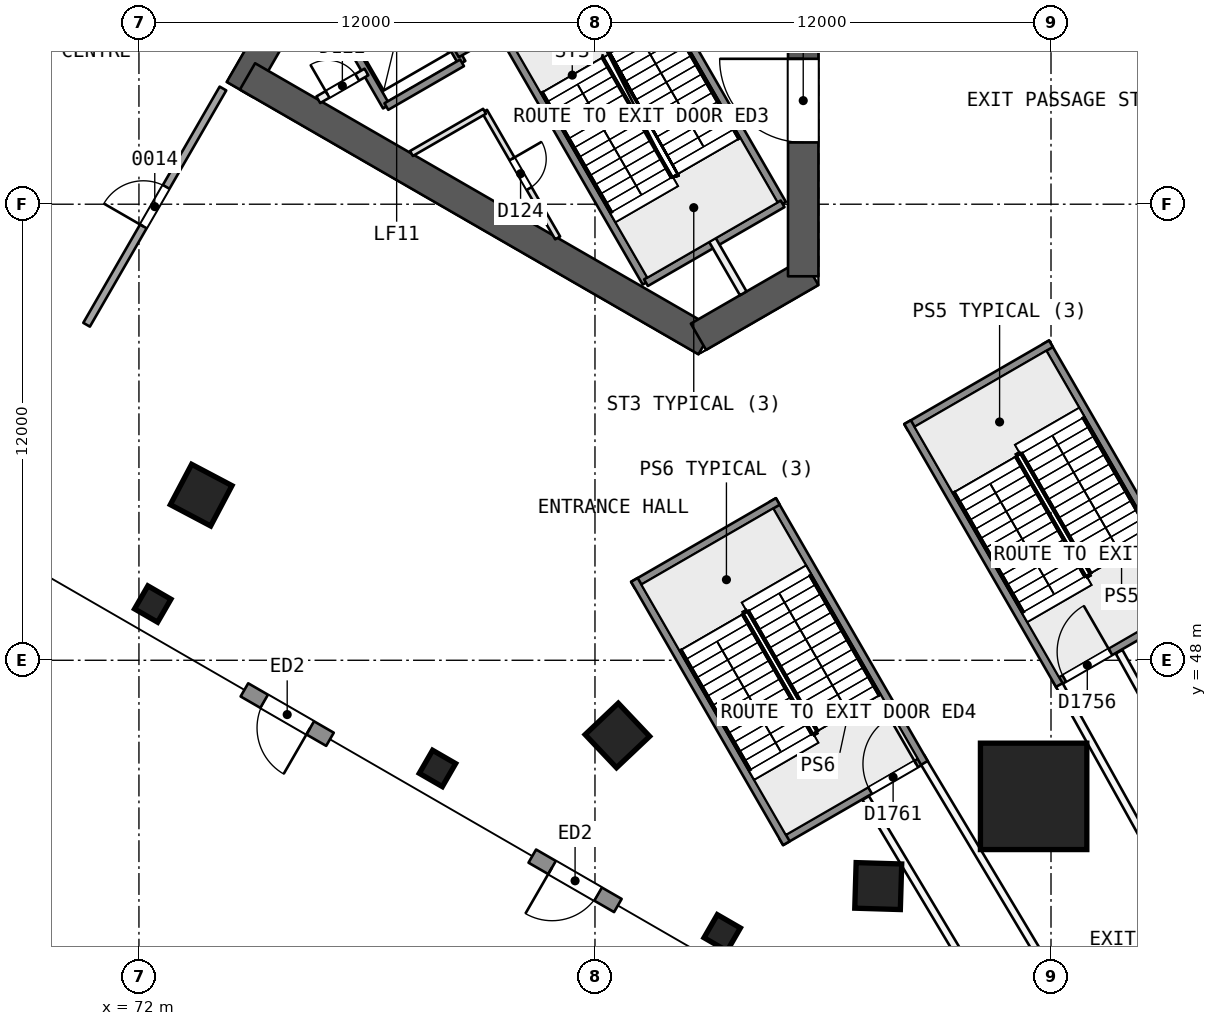
"""IFC4 building model, lengths in metres.
Left out: names, types, materials, properties, quantities, classifications, styles, units other than length and angle.
Written with IfcOpenShell. Run it as: python <this file> out.ifc"""

import sys

from ifc_helpers import new_model, si_unit, direction, frame, frame_2d, origin, origin_2d, place, context, subcontext, project, spatial, rectangle, extrude, element, fill, save


model = new_model("IFC4")
c1 = context("Model", 3, precision=1e-05, world=origin(), true_north=direction((0.0, 1.0)))
c2 = subcontext(c1, "Body", "Model", "MODEL_VIEW")
j1 = project(units=[si_unit("LENGTHUNIT", "METRE"), si_unit("PLANEANGLEUNIT", "RADIAN")], contexts=[c1])
p1 = place(None, origin())
s1 = spatial("IfcSite", under=j1, at=p1, CompositionType="ELEMENT")
p2 = place(p1, origin())
s2 = spatial("IfcBuilding", under=s1, at=p2, CompositionType="ELEMENT")
p3 = place(p2, origin())
s3 = spatial("IfcBuildingStorey", under=s2, at=p3, CompositionType="ELEMENT", Elevation=0.0)
p4 = place(p3, frame((79.731, 71.806, 0.0), z_axis=(0.0, 0.0, 1.0), x_axis=(-0.49999662545, -0.866027352073, 0.0)))
e1 = element("IfcWall", 1, at=p4, inside=s3, PredefinedType="SHEAR", context=c2, shape_type="SweptSolid", body=[
    extrude(rectangle(XDim=10.149, YDim=0.8, at=frame_2d((5.074, 0.0))), origin(), (0.0, 0.0, 1.0), 9.0),
])
p5 = place(p4, frame((0.719, 0.0, 0.0)))
e2 = element("IfcOpeningElement", 2, at=p5, cuts=e1, PredefinedType="OPENING", context=c2, shape_type="SweptSolid", body=[
    extrude(rectangle(XDim=1.2, YDim=2.1, at=frame_2d((0.6, 1.05))), frame((0.0, 0.411, 0.0), z_axis=(0.0, -1.0, 0.0), x_axis=(1.0, 0.0, 0.0)), (0.0, 0.0, 1.0), 0.821),
])
p6 = place(p3, frame((74.856, 63.363, 0.0), z_axis=(0.0, 0.0, 1.0), x_axis=(0.866029478545, -0.499992942241, 0.0)))
e3 = element("IfcWall", 3, at=p6, inside=s3, PredefinedType="SHEAR", context=c2, shape_type="SweptSolid", body=[
    extrude(rectangle(XDim=13.933, YDim=0.8, at=frame_2d((6.967, 0.0))), origin(), (0.0, 0.0, 1.0), 9.0),
])
p7 = place(p3, frame((86.723, 56.512, 0.0), z_axis=(0.0, 0.0, 1.0), x_axis=(0.866034355626, 0.499984494636, 0.0)))
e4 = element("IfcWall", 4, at=p7, inside=s3, PredefinedType="SHEAR", context=c2, shape_type="SweptSolid", body=[
    extrude(rectangle(XDim=3.414, YDim=0.8, at=frame_2d((1.707, 0.0))), origin(), (0.0, 0.0, 1.0), 9.0),
])
p8 = place(p3, frame((89.48, 58.103, 0.0), z_axis=(0.0, 0.0, 1.0), x_axis=(0.0, 1.0, 0.0)))
e5 = element("IfcWall", 5, at=p8, inside=s3, PredefinedType="SHEAR", context=c2, shape_type="SweptSolid", body=[
    extrude(rectangle(XDim=14.103, YDim=0.8, at=frame_2d((7.051, 0.0))), origin(), (0.0, 0.0, 1.0), 9.0),
])
p9 = place(p8, frame((3.522, 0.0, 0.0)))
e6 = element("IfcOpeningElement", 6, at=p9, cuts=e5, PredefinedType="OPENING", context=c2, shape_type="SweptSolid", body=[
    extrude(rectangle(XDim=2.2, YDim=2.1, at=frame_2d((1.1, 1.05))), frame((0.0, 0.411, 0.0), z_axis=(0.0, -1.0, 0.0), x_axis=(1.0, 0.0, 0.0)), (0.0, 0.0, 1.0), 0.821),
])
p10 = place(p3, frame((73.636, 52.318, 0.0), z_axis=(0.000867829423, 0.022807642022, 0.999739495237), x_axis=(-0.500355390418, -0.865584884997, 0.020181430685)))
e7 = element("IfcColumn", 7, at=p10, inside=s3, PredefinedType="COLUMN", context=c2, shape_type="SweptSolid", body=[
    extrude(rectangle(XDim=1.2, YDim=1.2, at=origin_2d()), origin(), (0.0, 0.0, 1.0), 9.002),
])
p11 = place(p3, frame((84.6, 45.988, 0.0), z_axis=(-0.008378546441, 0.028145408434, 0.999568724973), x_axis=(-0.500025098605, -0.865775601782, 0.02018683049)))
e8 = element("IfcColumn", 8, at=p11, inside=s3, PredefinedType="COLUMN", context=c2, shape_type="SweptSolid", body=[
    extrude(rectangle(XDim=1.2, YDim=1.2, at=origin_2d()), origin(), (0.0, 0.0, 1.0), 9.004),
])
p12 = place(p3, frame((95.564, 44.382, 0.0), z_axis=(-0.017594335484, 0.030498655501, 0.999379943451), x_axis=(0.499388079432, -0.86566264647, 0.035209780296)))
e9 = element("IfcColumn", 9, at=p12, inside=s3, PredefinedType="COLUMN", context=c2, shape_type="SweptSolid", body=[
    extrude(rectangle(XDim=2.8, YDim=2.8, at=origin_2d()), origin(), (0.0, 0.0, 1.0), 9.006),
])
p13 = place(p3, frame((91.472, 42.02, 0.0), z_axis=(-0.015018837551, 0.031962471973, 0.999376222903), x_axis=(0.397533128539, -0.916908599769, 0.035299169714)))
e10 = element("IfcColumn", 10, at=p13, inside=s3, PredefinedType="COLUMN", context=c2, shape_type="SweptSolid", body=[
    extrude(rectangle(XDim=1.2, YDim=1.2, at=origin_2d()), origin(), (0.0, 0.0, 1.0), 9.006),
])
for number, where, z_axis, x_axis in (
    (11, (72.363, 49.479, -0.4), (0.0, 0.0, 1.0), (0.5, 0.866, 0.0)),
    (12, (79.855, 45.154, -0.4), (0.0, 0.0, 1.0), (0.5, 0.866, 0.0)),
    (13, (87.348, 40.828, -0.4), (0.0, 0.0, 1.0), (0.5, 0.866, 0.0)),
):
    element("IfcColumn", number, at=place(p3, frame(where, z_axis=z_axis, x_axis=x_axis)), inside=s3, PredefinedType="COLUMN", context=c2, shape_type="SweptSolid", body=[
        extrude(rectangle(XDim=0.7, YDim=0.7, at=origin_2d()), origin(), (0.0, 0.0, 1.0), 9.4),
    ])
p14 = place(p3, frame((70.622, 56.829, 0.0), z_axis=(0.0, 0.0, 1.0), x_axis=(0.499995327129, 0.866028101651, 0.0)))
e14 = element("IfcWall", 14, at=p14, inside=s3, PredefinedType="PARTITIONING", context=c2, shape_type="SweptSolid", body=[
    extrude(rectangle(XDim=7.177, YDim=0.2, at=frame_2d((3.588, 0.0))), origin(), (0.0, 0.0, 1.0), 8.6),
])
p15 = place(p14, frame((2.988, 0.0, 0.0)))
e15 = element("IfcOpeningElement", 15, at=p15, cuts=e14, PredefinedType="OPENING", context=c2, shape_type="SweptSolid", body=[
    extrude(rectangle(XDim=1.2, YDim=2.4, at=frame_2d((0.6, 1.2))), frame((0.0, 0.11, 0.0), z_axis=(0.0, -1.0, 0.0), x_axis=(1.0, 0.0, 0.0)), (0.0, 0.0, 1.0), 0.221),
])
p16 = place(p3, frame((77.027, 45.921, 0.0), z_axis=(0.0, 0.0, 1.0), x_axis=(-0.866021400173, 0.500006934395, 0.0)))
e16 = element("IfcWall", 16, at=p16, inside=s3, PredefinedType="SOLIDWALL", context=c2, shape_type="SweptSolid", body=[
    extrude(rectangle(XDim=2.6, YDim=0.4, at=frame_2d((1.3, 0.0))), origin(), (0.0, 0.0, 1.0), 8.6),
])
p17 = place(p16, frame((0.6, 0.0, 0.0)))
e17 = element("IfcOpeningElement", 17, at=p17, cuts=e16, PredefinedType="OPENING", context=c2, shape_type="SweptSolid", body=[
    extrude(rectangle(XDim=1.4, YDim=2.4, at=frame_2d((0.7, 1.2))), frame((0.0, 0.21, 0.0), z_axis=(0.0, -1.0, 0.0), x_axis=(1.0, 0.0, 0.0)), (0.0, 0.0, 1.0), 0.421),
])
p18 = place(p3, frame((84.602, 41.547, 0.0), z_axis=(0.0, 0.0, 1.0), x_axis=(-0.866021400173, 0.500006934395, 0.0)))
e18 = element("IfcWall", 18, at=p18, inside=s3, PredefinedType="SOLIDWALL", context=c2, shape_type="SweptSolid", body=[
    extrude(rectangle(XDim=2.6, YDim=0.4, at=frame_2d((1.3, 0.0))), origin(), (0.0, 0.0, 1.0), 8.6),
])
p19 = place(p18, frame((0.6, 0.0, 0.0)))
e19 = element("IfcOpeningElement", 19, at=p19, cuts=e18, PredefinedType="OPENING", context=c2, shape_type="SweptSolid", body=[
    extrude(rectangle(XDim=1.4, YDim=2.4, at=frame_2d((0.7, 1.2))), frame((0.0, 0.21, 0.0), z_axis=(0.0, -1.0, 0.0), x_axis=(1.0, 0.0, 0.0)), (0.0, 0.0, 1.0), 0.421),
])
p20 = place(p3, frame((103.5, 40.636, 0.0), z_axis=(0.0, 0.0, 1.0), x_axis=(-0.866022959057, -0.500004234368, 0.0)))
e20 = element("IfcWall", 20, at=p20, inside=s3, PredefinedType="SOLIDWALL", context=c2, shape_type="SweptSolid", body=[
    extrude(rectangle(XDim=10.0, YDim=0.4, at=frame_2d((5.0, 0.0))), origin(), (0.0, 0.0, 1.0), 8.6),
])
p21 = place(p20, frame((7.1, 0.0, 0.0)))
e21 = element("IfcOpeningElement", 21, at=p21, cuts=e20, PredefinedType="OPENING", context=c2, shape_type="SweptSolid", body=[
    extrude(rectangle(XDim=1.4, YDim=2.4, at=frame_2d((0.7, 1.2))), frame((0.0, 0.21, 0.0), z_axis=(0.0, -1.0, 0.0), x_axis=(1.0, 0.0, 0.0)), (0.0, 0.0, 1.0), 0.421),
])
p22 = place(p20, frame((1.5, 0.0, 0.0)))
e22 = element("IfcOpeningElement", 22, at=p22, cuts=e20, PredefinedType="OPENING", context=c2, shape_type="SweptSolid", body=[
    extrude(rectangle(XDim=1.4, YDim=2.4, at=frame_2d((0.7, 1.2))), frame((0.0, 0.21, 0.0), z_axis=(0.0, -1.0, 0.0), x_axis=(1.0, 0.0, 0.0)), (0.0, 0.0, 1.0), 0.421),
])
p23 = place(p3, frame((77.135, 64.952, 0.0), z_axis=(0.0, 0.0, 1.0), x_axis=(0.499996545922, -0.866027397988, 0.0)))
e23 = element("IfcWall", 23, at=p23, inside=s3, PredefinedType="SOLIDWALL", context=c2, shape_type="SweptSolid", body=[
    extrude(rectangle(XDim=2.75, YDim=0.2, at=frame_2d((1.375, 0.0))), origin(), (0.0, 0.0, 1.0), 8.6),
])
p24 = place(p3, frame((81.094, 62.445, 0.0), z_axis=(0.0, 0.0, 1.0), x_axis=(0.499987921047, -0.866032377459, 0.0)))
e24 = element("IfcWall", 24, at=p24, inside=s3, PredefinedType="PARTITIONING", context=c2, shape_type="SweptSolid", body=[
    extrude(rectangle(XDim=3.848, YDim=0.15, at=frame_2d((1.924, 0.0))), origin(), (0.0, 0.0, 1.0), 8.6),
])
p25 = place(p24, frame((1.447, 0.0, 0.0)))
e25 = element("IfcOpeningElement", 25, at=p25, cuts=e24, PredefinedType="OPENING", context=c2, shape_type="SweptSolid", body=[
    extrude(rectangle(XDim=0.9, YDim=2.1, at=frame_2d((0.45, 1.05))), frame((0.0, 0.085, 0.0), z_axis=(0.0, -1.0, 0.0), x_axis=(1.0, 0.0, 0.0)), (0.0, 0.0, 1.0), 0.171),
])
p26 = place(p3, frame((79.127, 66.102, 0.0), z_axis=(0.0, 0.0, 1.0), x_axis=(0.499996545922, -0.866027397988, 0.0)))
e26 = element("IfcWall", 26, at=p26, inside=s3, PredefinedType="SOLIDWALL", context=c2, shape_type="SweptSolid", body=[
    extrude(rectangle(XDim=2.75, YDim=0.2, at=frame_2d((1.375, 0.0))), origin(), (0.0, 0.0, 1.0), 8.6),
])
p27 = place(p3, frame((81.493, 64.604, 0.0), z_axis=(0.0, 0.0, 1.0), x_axis=(0.500006057782, -0.866021906294, 0.0)))
e27 = element("IfcWall", 27, at=p27, inside=s3, PredefinedType="SOLIDWALL", context=c2, shape_type="SweptSolid", body=[
    extrude(rectangle(XDim=7.7, YDim=0.2, at=frame_2d((3.85, 0.0))), origin(), (0.0, 0.0, 1.0), 8.6),
])
p28 = place(p3, frame((87.09, 59.06, 0.0), z_axis=(0.0, 0.0, 1.0), x_axis=(0.499956811548, -0.866050337213, 0.0)))
e28 = element("IfcWall", 28, at=p28, inside=s3, PredefinedType="PARTITIONING", context=c2, shape_type="SweptSolid", body=[
    extrude(rectangle(XDim=1.623, YDim=0.2, at=frame_2d((0.812, 0.0))), origin(), (0.0, 0.0, 1.0), 8.6),
])
p29 = place(p3, frame((85.087, 66.679, 0.0), z_axis=(0.0, 0.0, 1.0), x_axis=(0.500019787375, -0.866013979237, 0.0)))
e29 = element("IfcWall", 29, at=p29, inside=s3, PredefinedType="SOLIDWALL", context=c2, shape_type="SweptSolid", body=[
    extrude(rectangle(XDim=7.7, YDim=0.2, at=frame_2d((3.85, 0.0))), origin(), (0.0, 0.0, 1.0), 8.6),
])
p30 = place(p29, frame((0.55, 0.0, 0.0)))
e30 = element("IfcOpeningElement", 30, at=p30, cuts=e29, PredefinedType="OPENING", context=c2, shape_type="SweptSolid", body=[
    extrude(rectangle(XDim=1.1, YDim=2.1, at=frame_2d((0.55, 1.05))), frame((0.0, 0.11, 0.0), z_axis=(0.0, -1.0, 0.0), x_axis=(1.0, 0.0, 0.0)), (0.0, 0.0, 1.0), 0.221),
])
p31 = place(p3, frame((76.72, 62.749, 0.0), z_axis=(0.0, 0.0, 1.0), x_axis=(0.866054810376, 0.49994906283, 0.0)))
e31 = element("IfcWall", 31, at=p31, inside=s3, PredefinedType="PARTITIONING", context=c2, shape_type="SweptSolid", body=[
    extrude(rectangle(XDim=1.461, YDim=0.2, at=frame_2d((0.73, 0.0))), origin(), (0.0, 0.0, 1.0), 8.6),
])
p32 = place(p31, frame((0.281, 0.0, 0.0)))
e32 = element("IfcOpeningElement", 32, at=p32, cuts=e31, PredefinedType="OPENING", context=c2, shape_type="SweptSolid", body=[
    extrude(rectangle(XDim=0.9, YDim=2.1, at=frame_2d((0.45, 1.05))), frame((0.0, 0.11, 0.0), z_axis=(0.0, -1.0, 0.0), x_axis=(1.0, 0.0, 0.0)), (0.0, 0.0, 1.0), 0.221),
])
p33 = place(p3, frame((80.367, 63.954, 0.0), z_axis=(0.0, 0.0, 1.0), x_axis=(0.866026575979, 0.499997969693, 0.0)))
e33 = element("IfcWall", 33, at=p33, inside=s3, PredefinedType="SOLIDWALL", context=c2, shape_type="SweptSolid", body=[
    extrude(rectangle(XDim=6.75, YDim=0.2, at=frame_2d((3.375, 0.0))), origin(), (0.0, 0.0, 1.0), 8.6),
])
p34 = place(p3, frame((78.51, 62.57, 0.0), z_axis=(0.0, 0.0, 1.0), x_axis=(0.866053019151, 0.499952165731, 0.0)))
e34 = element("IfcWall", 34, at=p34, inside=s3, PredefinedType="SOLIDWALL", context=c2, shape_type="SweptSolid", body=[
    extrude(rectangle(XDim=2.3, YDim=0.2, at=frame_2d((1.15, 0.0))), origin(), (0.0, 0.0, 1.0), 8.6),
])
p35 = place(p3, frame((79.17, 61.334, 0.0), z_axis=(0.0, 0.0, 1.0), x_axis=(0.866030041738, 0.499991966744, 0.0)))
e35 = element("IfcWall", 35, at=p35, inside=s3, PredefinedType="PARTITIONING", context=c2, shape_type="SweptSolid", body=[
    extrude(rectangle(XDim=2.222, YDim=0.15, at=frame_2d((1.111, 0.0))), origin(), (0.0, 0.0, 1.0), 8.6),
])
p36 = place(p3, frame((85.343, 57.935, 0.0), z_axis=(0.0, 0.0, 1.0), x_axis=(0.866004344652, 0.500036473714, 0.0)))
e36 = element("IfcWall", 36, at=p36, inside=s3, PredefinedType="SOLIDWALL", context=c2, shape_type="SweptSolid", body=[
    extrude(rectangle(XDim=4.15, YDim=0.2, at=frame_2d((2.075, 0.0))), origin(), (0.0, 0.0, 1.0), 8.6),
])
p37 = place(p3, frame((96.089, 47.373, 0.0), z_axis=(0.0, 0.0, 1.0), x_axis=(0.866018331238, 0.50001224981, 0.0)))
e37 = element("IfcWall", 37, at=p37, inside=s3, PredefinedType="SOLIDWALL", context=c2, shape_type="SweptSolid", body=[
    extrude(rectangle(XDim=4.4, YDim=0.2, at=frame_2d((2.2, 0.0))), origin(), (0.0, 0.0, 1.0), 8.6),
])
p38 = place(p37, frame((0.3, 0.0, 0.0)))
e38 = element("IfcOpeningElement", 38, at=p38, cuts=e37, PredefinedType="OPENING", context=c2, shape_type="SweptSolid", body=[
    extrude(rectangle(XDim=1.4, YDim=2.1, at=frame_2d((0.7, 1.05))), frame((0.0, 0.11, 0.0), z_axis=(0.0, -1.0, 0.0), x_axis=(1.0, 0.0, 0.0)), (0.0, 0.0, 1.0), 0.221),
])
p39 = place(p3, frame((99.863, 49.437, 0.0), z_axis=(0.0, 0.0, 1.0), x_axis=(-0.49999894854, 0.866026010844, 0.0)))
e39 = element("IfcWall", 39, at=p39, inside=s3, PredefinedType="SOLIDWALL", context=c2, shape_type="SweptSolid", body=[
    extrude(rectangle(XDim=8.0, YDim=0.2, at=frame_2d((4.0, 0.0))), origin(), (0.0, 0.0, 1.0), 8.6),
])
p40 = place(p3, frame((95.999, 56.328, 0.0), z_axis=(0.0, 0.0, 1.0), x_axis=(-0.866032203192, -0.499988222896, 0.0)))
e40 = element("IfcWall", 40, at=p40, inside=s3, PredefinedType="SOLIDWALL", context=c2, shape_type="SweptSolid", body=[
    extrude(rectangle(XDim=4.4, YDim=0.2, at=frame_2d((2.2, 0.0))), origin(), (0.0, 0.0, 1.0), 8.6),
])
p41 = place(p3, frame((92.225, 54.265, 0.0), z_axis=(0.0, 0.0, 1.0), x_axis=(0.49999894854, -0.866026010844, 0.0)))
e41 = element("IfcWall", 41, at=p41, inside=s3, PredefinedType="SOLIDWALL", context=c2, shape_type="SweptSolid", body=[
    extrude(rectangle(XDim=8.0, YDim=0.2, at=frame_2d((4.0, 0.0))), origin(), (0.0, 0.0, 1.0), 8.6),
])
p42 = place(p3, frame((96.218, 47.349, 0.0), z_axis=(0.0, 0.0, 1.0), x_axis=(0.486178564257, -0.873859487364, 0.0)))
e42 = element("IfcWall", 42, at=p42, inside=s3, PredefinedType="PARTITIONING", context=c2, shape_type="SweptSolid", body=[
    extrude(rectangle(XDim=9.441, YDim=0.2, at=frame_2d((4.721, 0.0))), origin(), (0.0, 0.0, 1.0), 8.6),
])
p43 = place(p3, frame((102.381, 39.974, 0.0), z_axis=(0.0, 0.0, 1.0), x_axis=(-0.486169803384, 0.873864361487, 0.0)))
e43 = element("IfcWall", 43, at=p43, inside=s3, PredefinedType="PARTITIONING", context=c2, shape_type="SweptSolid", body=[
    extrude(rectangle(XDim=9.441, YDim=0.2, at=frame_2d((4.72, 0.0))), origin(), (0.0, 0.0, 1.0), 8.6),
])
p44 = place(p3, frame((88.901, 43.223, 0.0), z_axis=(0.0, 0.0, 1.0), x_axis=(0.866032203192, 0.499988222896, 0.0)))
e44 = element("IfcWall", 44, at=p44, inside=s3, PredefinedType="SOLIDWALL", context=c2, shape_type="SweptSolid", body=[
    extrude(rectangle(XDim=4.4, YDim=0.2, at=frame_2d((2.2, 0.0))), origin(), (0.0, 0.0, 1.0), 8.6),
])
p45 = place(p44, frame((2.7, 0.0, 0.0)))
e45 = element("IfcOpeningElement", 45, at=p45, cuts=e44, PredefinedType="OPENING", context=c2, shape_type="SweptSolid", body=[
    extrude(rectangle(XDim=1.4, YDim=2.1, at=frame_2d((0.7, 1.05))), frame((0.0, 0.11, 0.0), z_axis=(0.0, -1.0, 0.0), x_axis=(1.0, 0.0, 0.0)), (0.0, 0.0, 1.0), 0.221),
])
p46 = place(p3, frame((92.675, 45.287, 0.0), z_axis=(0.0, 0.0, 1.0), x_axis=(-0.49999894854, 0.866026010844, 0.0)))
e46 = element("IfcWall", 46, at=p46, inside=s3, PredefinedType="SOLIDWALL", context=c2, shape_type="SweptSolid", body=[
    extrude(rectangle(XDim=8.0, YDim=0.2, at=frame_2d((4.0, 0.0))), origin(), (0.0, 0.0, 1.0), 8.6),
])
p47 = place(p3, frame((88.811, 52.178, 0.0), z_axis=(0.0, 0.0, 1.0), x_axis=(-0.866032203192, -0.499988222896, 0.0)))
e47 = element("IfcWall", 47, at=p47, inside=s3, PredefinedType="SOLIDWALL", context=c2, shape_type="SweptSolid", body=[
    extrude(rectangle(XDim=4.4, YDim=0.2, at=frame_2d((2.2, 0.0))), origin(), (0.0, 0.0, 1.0), 8.6),
])
p48 = place(p3, frame((85.037, 50.115, 0.0), z_axis=(0.0, 0.0, 1.0), x_axis=(0.49999894854, -0.866026010844, 0.0)))
e48 = element("IfcWall", 48, at=p48, inside=s3, PredefinedType="SOLIDWALL", context=c2, shape_type="SweptSolid", body=[
    extrude(rectangle(XDim=8.0, YDim=0.2, at=frame_2d((4.0, 0.0))), origin(), (0.0, 0.0, 1.0), 8.6),
])
p49 = place(p3, frame((97.517, 37.199, 0.0), z_axis=(0.0, 0.0, 1.0), x_axis=(-0.51369309386, 0.857974012031, 0.0)))
e49 = element("IfcWall", 49, at=p49, inside=s3, PredefinedType="PARTITIONING", context=c2, shape_type="SweptSolid", body=[
    extrude(rectangle(XDim=9.441, YDim=0.2, at=frame_2d((4.72, 0.0))), origin(), (0.0, 0.0, 1.0), 8.6),
])
p50 = place(p3, frame((91.123, 44.374, 0.0), z_axis=(0.0, 0.0, 1.0), x_axis=(0.51370073235, -0.857969438607, 0.0)))
e50 = element("IfcWall", 50, at=p50, inside=s3, PredefinedType="PARTITIONING", context=c2, shape_type="SweptSolid", body=[
    extrude(rectangle(XDim=9.441, YDim=0.2, at=frame_2d((4.72, 0.0))), origin(), (0.0, 0.0, 1.0), 8.6),
])
p51 = place(p3, frame((76.795, 41.436, -0.2), z_axis=(0.0, 0.0, 1.0), x_axis=(0.866025403784, -0.5, 0.0)))
e51 = element("IfcColumn", 51, at=p51, inside=s3, PredefinedType="COLUMN", context=c2, shape_type="SweptSolid", body=[
    extrude(rectangle(XDim=1.2, YDim=1.2, at=origin_2d()), origin(), (0.0, 0.0, 1.0), 9.2),
])
p52 = place(p15, origin())
e52 = element("IfcDoor", 52, at=p52, inside=s3, OperationType="SINGLE_SWING_LEFT", PredefinedType="NOTDEFINED", context=c2, shape_type="SweptSolid", body=[
    extrude(rectangle(XDim=1.2, YDim=2.4, at=frame_2d((0.6, 1.2))), frame((0.0, 0.025, 0.0), z_axis=(0.0, -1.0, 0.0), x_axis=(1.0, 0.0, 0.0)), (0.0, 0.0, 1.0), 0.05),
])
fill(e15, e52)
p53 = place(p17, origin())
e53 = element("IfcDoor", 53, at=p53, inside=s3, OperationType="SINGLE_SWING_LEFT", PredefinedType="NOTDEFINED", context=c2, shape_type="SweptSolid", body=[
    extrude(rectangle(XDim=1.4, YDim=2.4, at=frame_2d((0.7, 1.2))), frame((0.0, 0.025, 0.0), z_axis=(0.0, -1.0, 0.0), x_axis=(1.0, 0.0, 0.0)), (0.0, 0.0, 1.0), 0.05),
])
fill(e17, e53)
p54 = place(p19, origin())
e54 = element("IfcDoor", 54, at=p54, inside=s3, OperationType="SINGLE_SWING_RIGHT", PredefinedType="NOTDEFINED", context=c2, shape_type="SweptSolid", body=[
    extrude(rectangle(XDim=1.4, YDim=2.4, at=frame_2d((0.7, 1.2))), frame((0.0, 0.025, 0.0), z_axis=(0.0, -1.0, 0.0), x_axis=(1.0, 0.0, 0.0)), (0.0, 0.0, 1.0), 0.05),
])
fill(e19, e54)
p55 = place(p32, origin())
e55 = element("IfcDoor", 55, at=p55, inside=s3, OperationType="SINGLE_SWING_LEFT", PredefinedType="NOTDEFINED", context=c2, shape_type="SweptSolid", body=[
    extrude(rectangle(XDim=0.9, YDim=2.1, at=frame_2d((0.45, 1.05))), frame((0.0, 0.025, 0.0), z_axis=(0.0, -1.0, 0.0), x_axis=(1.0, 0.0, 0.0)), (0.0, 0.0, 1.0), 0.05),
])
fill(e32, e55)
p56 = place(p25, origin())
e56 = element("IfcDoor", 56, at=p56, inside=s3, OperationType="SINGLE_SWING_LEFT", PredefinedType="NOTDEFINED", context=c2, shape_type="SweptSolid", body=[
    extrude(rectangle(XDim=0.9, YDim=2.1, at=frame_2d((0.45, 1.05))), frame((0.0, 0.025, 0.0), z_axis=(0.0, -1.0, 0.0), x_axis=(1.0, 0.0, 0.0)), (0.0, 0.0, 1.0), 0.05),
])
fill(e25, e56)
p57 = place(p9, origin())
e57 = element("IfcDoor", 57, at=p57, inside=s3, OperationType="SINGLE_SWING_RIGHT", PredefinedType="NOTDEFINED", context=c2, shape_type="SweptSolid", body=[
    extrude(rectangle(XDim=2.2, YDim=2.1, at=frame_2d((1.1, 1.05))), frame((0.0, 0.025, 0.0), z_axis=(0.0, -1.0, 0.0), x_axis=(1.0, 0.0, 0.0)), (0.0, 0.0, 1.0), 0.05),
])
fill(e6, e57)
p58 = place(p38, origin())
e58 = element("IfcDoor", 58, at=p58, inside=s3, OperationType="SINGLE_SWING_RIGHT", PredefinedType="NOTDEFINED", context=c2, shape_type="SweptSolid", body=[
    extrude(rectangle(XDim=1.4, YDim=2.1, at=frame_2d((0.7, 1.05))), frame((0.0, 0.025, 0.0), z_axis=(0.0, -1.0, 0.0), x_axis=(1.0, 0.0, 0.0)), (0.0, 0.0, 1.0), 0.05),
])
fill(e38, e58)
p59 = place(p45, origin())
e59 = element("IfcDoor", 59, at=p59, inside=s3, OperationType="SINGLE_SWING_RIGHT", PredefinedType="NOTDEFINED", context=c2, shape_type="SweptSolid", body=[
    extrude(rectangle(XDim=1.4, YDim=2.1, at=frame_2d((0.7, 1.05))), frame((0.0, 0.025, 0.0), z_axis=(0.0, -1.0, 0.0), x_axis=(1.0, 0.0, 0.0)), (0.0, 0.0, 1.0), 0.05),
])
fill(e45, e59)
save(model, sys.argv[1])
